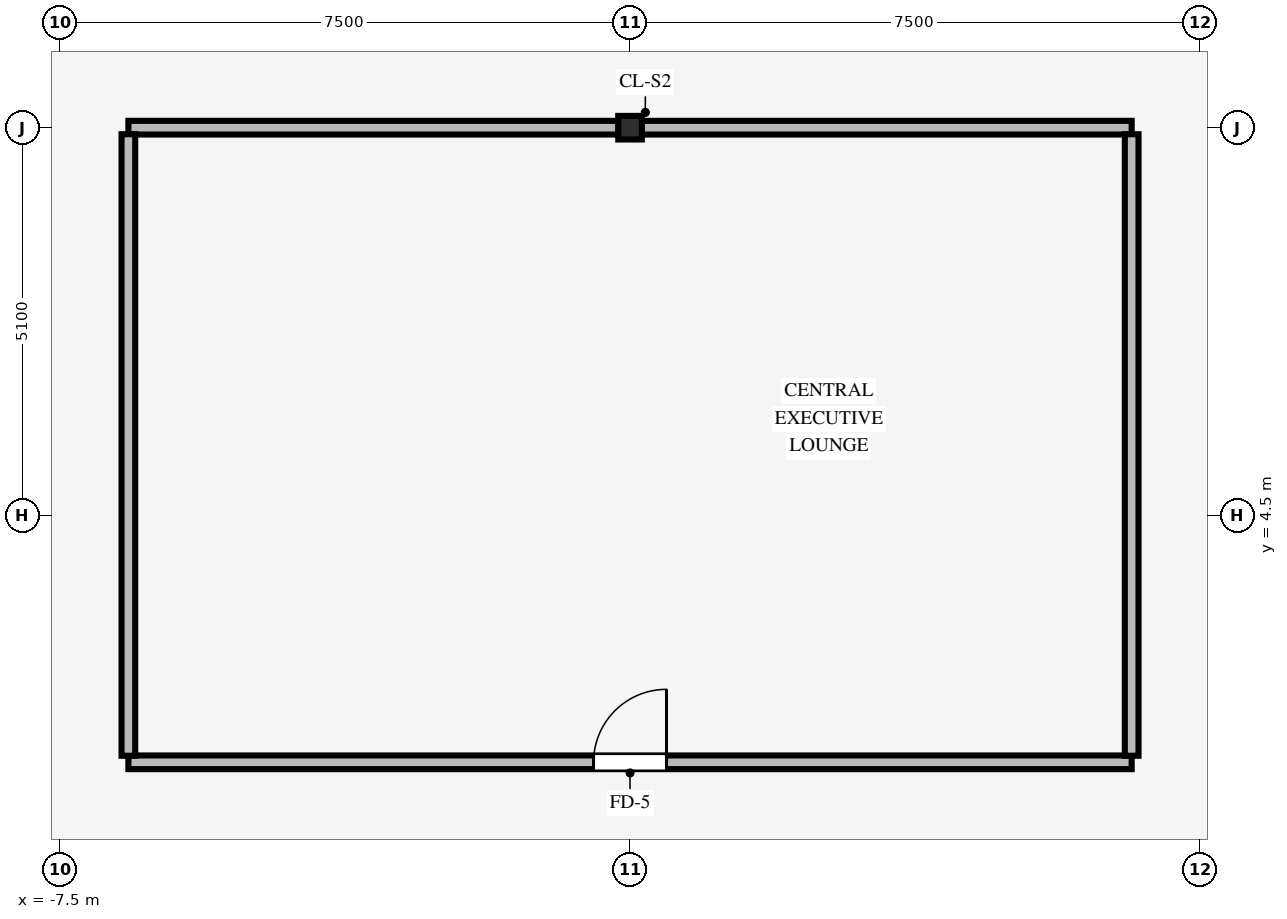
"""IFC4 building model, lengths in metres.
Left out: names, types, materials, properties, quantities, classifications, styles, units other than length and angle.
Written with IfcOpenShell. Run it as: python <this file> out.ifc"""

import sys

from ifc_helpers import new_model, si_unit, direction, frame, frame_2d, origin, origin_2d, place, context, subcontext, project, spatial, rectangle, i_section, extrude, source, transform, mapped, element, fill, save


model = new_model("IFC4")
c1 = context("Model", 3, precision=1e-05, world=origin(), true_north=direction((0.0, 1.0)))
c2 = subcontext(c1, "Body", "Model", "MODEL_VIEW")
j1 = project(units=[si_unit("LENGTHUNIT", "METRE"), si_unit("PLANEANGLEUNIT", "RADIAN")], contexts=[c1])
p1 = place(None, origin())
s1 = spatial("IfcSite", under=j1, at=p1, CompositionType="ELEMENT")
p2 = place(p1, origin())
s2 = spatial("IfcBuilding", under=s1, at=p2, CompositionType="ELEMENT")
p3 = place(p2, frame((0.0, 0.0, 245.65)))
s3 = spatial("IfcBuildingStorey", under=s2, at=p3, CompositionType="ELEMENT", Elevation=245.65)
p4 = place(p3, frame((0.0, 9.6, 0.0), z_axis=(0.0, 0.0, 1.0), x_axis=(1.0, 0.0, 0.0)))
e1 = element("IfcColumn", 1, at=p4, inside=s3, PredefinedType="COLUMN", context=c2, shape_type="SweptSolid", body=[
    extrude(i_section(OverallWidth=0.31, OverallDepth=0.31, WebThickness=0.015, FlangeThickness=0.015, FilletRadius=0.015, at=origin_2d()), origin(), (0.0, 0.0, 1.0), 3.37),
])
p5 = place(p3, frame((-6.6, 1.25, 0.0), z_axis=(0.0, 0.0, 1.0), x_axis=(1.0, 0.0, 0.0)))
e2 = element("IfcWall", 2, at=p5, inside=s3, PredefinedType="PARTITIONING", context=c2, shape_type="SweptSolid", body=[
    extrude(rectangle(XDim=13.2, YDim=0.18, at=frame_2d((6.6, 0.0))), origin(), (0.0, 0.0, 1.0), 3.36),
])
p6 = place(p5, frame((6.12, 0.0, 0.0)))
e3 = element("IfcOpeningElement", 3, at=p6, cuts=e2, PredefinedType="OPENING", context=c2, shape_type="SweptSolid", body=[
    extrude(rectangle(XDim=0.96, YDim=2.1, at=frame_2d((0.48, 1.05))), frame((0.0, 0.1, 0.0), z_axis=(0.0, -1.0, 0.0), x_axis=(1.0, 0.0, 0.0)), (0.0, 0.0, 1.0), 0.2),
])
for number, where, z_axis, x_axis in (
    (4, (-6.6, 9.6, 0.0), (0.0, 0.0, 1.0), (1.0, 0.0, 0.0)),
    (5, (0.151, 9.6, 0.0), (0.0, 0.0, 1.0), (1.0, 0.0, 0.0)),
):
    element("IfcWall", number, at=place(p3, frame(where, z_axis=z_axis, x_axis=x_axis)), inside=s3, PredefinedType="PARTITIONING", context=c2, shape_type="SweptSolid", body=[
        extrude(rectangle(XDim=6.449, YDim=0.18, at=frame_2d((3.225, 0.0))), origin(), (0.0, 0.0, 1.0), 2.405),
    ])
for number, where, z_axis, x_axis in (
    (6, (-6.6, 1.336, 0.0), (0.0, 0.0, 1.0), (0.0, 1.0, 0.0)),
    (7, (6.6, 1.336, 0.0), (0.0, 0.0, 1.0), (0.0, 1.0, 0.0)),
):
    element("IfcWall", number, at=place(p3, frame(where, z_axis=z_axis, x_axis=x_axis)), inside=s3, PredefinedType="PARTITIONING", context=c2, shape_type="SweptSolid", body=[
        extrude(rectangle(XDim=8.178, YDim=0.18, at=frame_2d((4.089, 0.0))), origin(), (0.0, 0.0, 1.0), 3.36),
    ])
m1 = source(origin(), c2, "Body", "SweptSolid", [
    extrude(rectangle(XDim=0.96, YDim=2.1, at=frame_2d((0.48, 1.05))), frame((0.0, 0.025, 0.0), z_axis=(0.0, -1.0, 0.0), x_axis=(1.0, 0.0, 0.0)), (0.0, 0.0, 1.0), 0.05),
])
p7 = place(p6, origin())
e8 = element("IfcDoor", 8, at=p7, inside=s3, OperationType="SINGLE_SWING_RIGHT", PredefinedType="DOOR", context=c2, shape_type="MappedRepresentation", body=[
    mapped(m1, transform((0.0, 0.0, 0.0), scale=1.0)),
])
fill(e3, e8)
save(model, sys.argv[1])
